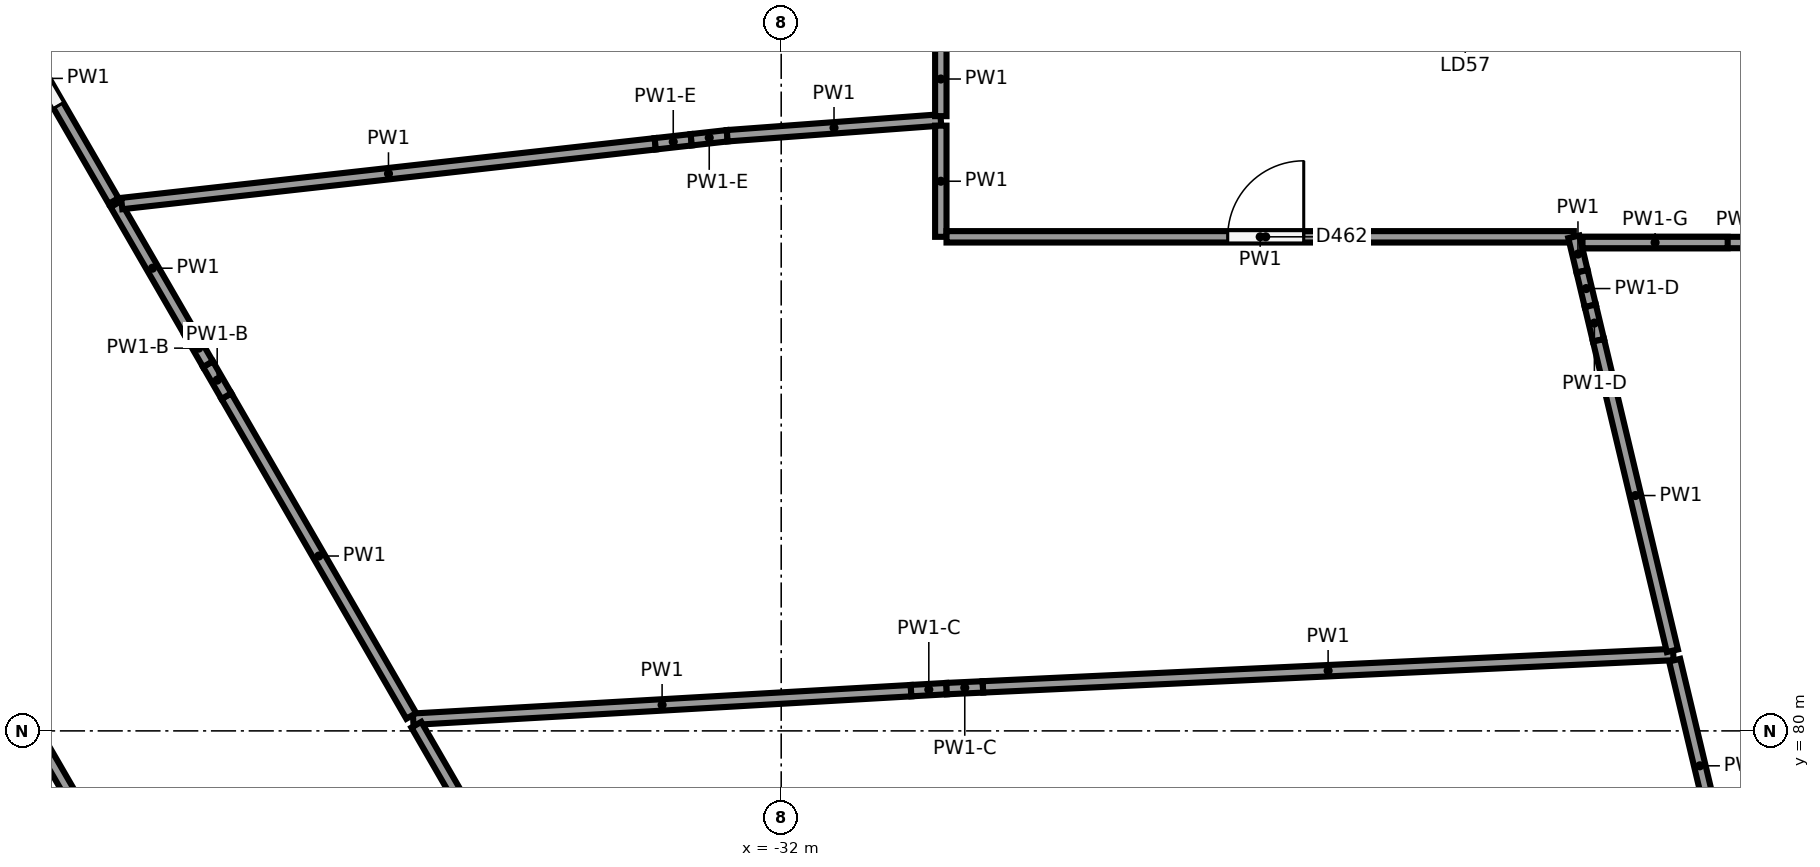
"""IFC4 building model, lengths in metres.
Left out: names, types, materials, properties, quantities, classifications, styles, units other than length and angle.
Written with IfcOpenShell. Run it as: python <this file> out.ifc"""

import sys

from ifc_helpers import new_model, si_unit, direction, frame, frame_2d, origin, origin_2d, place, context, subcontext, project, spatial, rectangle, circle, extrude, element, fill, save


model = new_model("IFC4")
c1 = context("Model", 3, precision=1e-05, world=origin(), true_north=direction((0.0, 1.0)))
c2 = subcontext(c1, "Body", "Model", "MODEL_VIEW")
j1 = project(units=[si_unit("LENGTHUNIT", "METRE"), si_unit("PLANEANGLEUNIT", "RADIAN")], contexts=[c1])
p1 = place(None, origin())
s1 = spatial("IfcSite", under=j1, at=p1, CompositionType="ELEMENT")
p2 = place(p1, origin())
s2 = spatial("IfcBuilding", under=s1, at=p2, CompositionType="ELEMENT")
p3 = place(p2, frame((0.0, 0.0, -4.0)))
s3 = spatial("IfcBuildingStorey", under=s2, at=p3, CompositionType="ELEMENT", Elevation=-4.0)
p4 = place(p3, frame((-19.119, 85.698, -1.2), z_axis=(0.0, 0.0, 1.0), x_axis=(1.0, 0.0, 0.0)))
e1 = element("IfcColumn", 1, at=p4, inside=s3, PredefinedType="COLUMN", context=c2, shape_type="SweptSolid", body=[
    extrude(circle(Radius=0.4, at=origin_2d()), origin(), (0.0, 0.0, 1.0), 5.2),
])
p5 = place(p3, frame((-31.737, 85.377, -0.4), z_axis=(0.0, 0.0, 1.0), x_axis=(1.0, 0.0, 0.0)))
e2 = element("IfcColumn", 2, at=p5, inside=s3, PredefinedType="COLUMN", context=c2, shape_type="SweptSolid", body=[
    extrude(circle(Radius=0.4, at=origin_2d()), origin(), (0.0, 0.0, 1.0), 4.4),
])
p6 = place(p3, frame((-36.842, 80.154, 0.0), z_axis=(0.0, 0.0, 1.0), x_axis=(0.998361145806, 0.057227812689, 0.0)))
e3 = element("IfcWall", 3, at=p6, inside=s3, PredefinedType="PARTITIONING", context=c2, shape_type="SweptSolid", body=[
    extrude(rectangle(XDim=6.561, YDim=0.15, at=frame_2d((3.281, 0.0))), origin(), (0.0, 0.0, 1.0), 3.6),
])
p7 = place(p3, frame((-30.292, 80.529, 0.0), z_axis=(0.0, 0.0, 1.0), x_axis=(0.998356035671, 0.057316891401, 0.0)))
e4 = element("IfcWall", 4, at=p7, inside=s3, PredefinedType="PARTITIONING", context=c2, shape_type="SweptSolid", body=[
    extrude(rectangle(XDim=0.469, YDim=0.15, at=frame_2d((0.234, 0.0))), origin(), (0.0, 0.0, 1.0), 2.7),
])
p8 = place(p3, frame((-29.824, 80.556, 0.0), z_axis=(0.0, 0.0, 1.0), x_axis=(0.998899071447, 0.046911033473, 0.0)))
e5 = element("IfcWall", 5, at=p8, inside=s3, PredefinedType="PARTITIONING", context=c2, shape_type="SweptSolid", body=[
    extrude(rectangle(XDim=0.479, YDim=0.15, at=frame_2d((0.239, 0.0))), origin(), (0.0, 0.0, 1.0), 2.7),
])
p9 = place(p3, frame((-29.346, 80.579, 0.0), z_axis=(0.0, 0.0, 1.0), x_axis=(0.998901839674, 0.04685205113, 0.0)))
e6 = element("IfcWall", 6, at=p9, inside=s3, PredefinedType="PARTITIONING", context=c2, shape_type="SweptSolid", body=[
    extrude(rectangle(XDim=9.093, YDim=0.15, at=frame_2d((4.546, 0.0))), origin(), (0.0, 0.0, 1.0), 3.6),
])
p10 = place(p3, frame((-20.245, 80.93, 0.0), z_axis=(0.0, 0.0, 1.0), x_axis=(0.231605127585, -0.972809881157, 0.0)))
e7 = element("IfcWall", 7, at=p10, inside=s3, PredefinedType="PARTITIONING", context=c2, shape_type="SweptSolid", body=[
    extrude(rectangle(XDim=2.858, YDim=0.15, at=frame_2d((1.429, 0.0))), origin(), (0.0, 0.0, 1.0), 3.6),
])
p11 = place(p3, frame((-35.411, 77.677, 0.0), z_axis=(0.0, 0.0, 1.0), x_axis=(-0.500422625408, 0.865781263357, 0.0)))
e8 = element("IfcWall", 8, at=p11, inside=s3, PredefinedType="PARTITIONING", context=c2, shape_type="SweptSolid", body=[
    extrude(rectangle(XDim=2.776, YDim=0.15, at=frame_2d((1.388, 0.0))), origin(), (0.0, 0.0, 1.0), 3.6),
])
p12 = place(p3, frame((-36.867, 80.197, 0.0), z_axis=(0.0, 0.0, 1.0), x_axis=(-0.50047176729, 0.865752857429, 0.0)))
e9 = element("IfcWall", 9, at=p12, inside=s3, PredefinedType="PARTITIONING", context=c2, shape_type="SweptSolid", body=[
    extrude(rectangle(XDim=4.86, YDim=0.15, at=frame_2d((2.43, 0.0))), origin(), (0.0, 0.0, 1.0), 3.6),
])
for number, where, z_axis, x_axis in (
    (10, (-39.299, 84.404, 0.0), (0.0, 0.0, 1.0), (-0.5, 0.866, 0.0)),
    (11, (-39.542, 84.825, 0.0), (0.0, 0.0, 1.0), (-0.5, 0.866, 0.0)),
):
    element("IfcWall", number, at=place(p3, frame(where, z_axis=z_axis, x_axis=x_axis)), inside=s3, PredefinedType="PARTITIONING", context=c2, shape_type="SweptSolid", body=[
        extrude(rectangle(XDim=0.486, YDim=0.15, at=frame_2d((0.243, 0.0))), origin(), (0.0, 0.0, 1.0), 2.5),
    ])
p13 = place(p3, frame((-39.786, 85.246, 0.0), z_axis=(0.0, 0.0, 1.0), x_axis=(-0.500352922439, 0.865821548015, 0.0)))
e12 = element("IfcWall", 12, at=p13, inside=s3, PredefinedType="PARTITIONING", context=c2, shape_type="SweptSolid", body=[
    extrude(rectangle(XDim=1.944, YDim=0.15, at=frame_2d((0.972, 0.0))), origin(), (0.0, 0.0, 1.0), 3.6),
])
p14 = place(p3, frame((-40.677, 86.938, 0.0), z_axis=(0.0, 0.0, 1.0), x_axis=(0.993791931288, 0.11125465072, 0.0)))
e13 = element("IfcWall", 13, at=p14, inside=s3, PredefinedType="PARTITIONING", context=c2, shape_type="SweptSolid", body=[
    extrude(rectangle(XDim=7.064, YDim=0.15, at=frame_2d((3.532, 0.0))), origin(), (0.0, 0.0, 1.0), 3.6),
])
for number, where, z_axis, x_axis in (
    (14, (-33.657, 87.724, 0.0), (0.0, 0.0, 1.0), (0.994, 0.111, 0.0)),
    (15, (-33.184, 87.777, 0.0), (0.0, 0.0, 1.0), (0.994, 0.111, 0.0)),
):
    element("IfcWall", number, at=place(p3, frame(where, z_axis=z_axis, x_axis=x_axis)), inside=s3, PredefinedType="PARTITIONING", context=c2, shape_type="SweptSolid", body=[
        extrude(rectangle(XDim=0.476, YDim=0.15, at=frame_2d((0.238, 0.0))), origin(), (0.0, 0.0, 1.0), 2.85),
    ])
p15 = place(p3, frame((-32.71, 87.83, 0.0), z_axis=(0.0, 0.0, 1.0), x_axis=(0.997265626559, 0.07390040652, 0.0)))
e16 = element("IfcWall", 16, at=p15, inside=s3, PredefinedType="PARTITIONING", context=c2, shape_type="SweptSolid", body=[
    extrude(rectangle(XDim=2.818, YDim=0.15, at=frame_2d((1.409, 0.0))), origin(), (0.0, 0.0, 1.0), 3.6),
])
p16 = place(p3, frame((-29.9, 87.963, 0.0), z_axis=(0.0, 0.0, 1.0), x_axis=(0.0, -1.0, 0.0)))
e17 = element("IfcWall", 17, at=p16, inside=s3, PredefinedType="PARTITIONING", context=c2, shape_type="SweptSolid", body=[
    extrude(rectangle(XDim=1.463, YDim=0.15, at=frame_2d((0.731, 0.0))), origin(), (0.0, 0.0, 1.0), 3.6),
])
p17 = place(p3, frame((-29.825, 86.5, 0.0), z_axis=(0.0, 0.0, 1.0), x_axis=(1.0, 0.0, 0.0)))
e18 = element("IfcWall", 18, at=p17, inside=s3, PredefinedType="PARTITIONING", context=c2, shape_type="SweptSolid", body=[
    extrude(rectangle(XDim=8.254, YDim=0.15, at=frame_2d((4.127, 0.0))), origin(), (0.0, 0.0, 1.0), 3.6),
])
p18 = place(p17, frame((3.7, 0.0, 0.0)))
e19 = element("IfcOpeningElement", 19, at=p18, cuts=e18, PredefinedType="OPENING", context=c2, shape_type="SweptSolid", body=[
    extrude(rectangle(XDim=1.0, YDim=2.1, at=frame_2d((0.5, 1.05))), frame((0.0, 0.085, 0.0), z_axis=(0.0, -1.0, 0.0), x_axis=(1.0, 0.0, 0.0)), (0.0, 0.0, 1.0), 0.17),
])
p19 = place(p3, frame((-21.571, 86.5, 0.0), z_axis=(0.0, 0.0, 1.0), x_axis=(0.231809170102, -0.972761280406, 0.0)))
e20 = element("IfcWall", 20, at=p19, inside=s3, PredefinedType="PARTITIONING", context=c2, shape_type="SweptSolid", body=[
    extrude(rectangle(XDim=0.467, YDim=0.15, at=frame_2d((0.233, 0.0))), origin(), (0.0, 0.0, 1.0), 3.6),
])
for number, where, z_axis, x_axis in (
    (21, (-21.463, 86.046, 0.0), (0.0, 0.0, 1.0), (0.231, -0.973, 0.0)),
    (22, (-21.355, 85.592, 0.0), (0.0, 0.0, 1.0), (0.232, -0.973, 0.0)),
):
    element("IfcWall", number, at=place(p3, frame(where, z_axis=z_axis, x_axis=x_axis)), inside=s3, PredefinedType="PARTITIONING", context=c2, shape_type="SweptSolid", body=[
        extrude(rectangle(XDim=0.467, YDim=0.15, at=frame_2d((0.233, 0.0))), origin(), (0.0, 0.0, 1.0), 2.3),
    ])
p20 = place(p3, frame((-21.247, 85.138, 0.0), z_axis=(0.0, 0.0, 1.0), x_axis=(0.231615286229, -0.972807462546, 0.0)))
e23 = element("IfcWall", 23, at=p20, inside=s3, PredefinedType="PARTITIONING", context=c2, shape_type="SweptSolid", body=[
    extrude(rectangle(XDim=4.198, YDim=0.15, at=frame_2d((2.099, 0.0))), origin(), (0.0, 0.0, 1.0), 3.6),
])
p21 = place(p3, frame((-40.783, 86.972, 0.0), z_axis=(0.0, 0.0, 1.0), x_axis=(-0.50040316576, 0.865792510765, 0.0)))
e24 = element("IfcWall", 24, at=p21, inside=s3, PredefinedType="PARTITIONING", context=c2, shape_type="SweptSolid", body=[
    extrude(rectangle(XDim=3.725, YDim=0.15, at=frame_2d((1.863, 0.0))), origin(), (0.0, 0.0, 1.0), 3.6),
])
p22 = place(p21, frame((1.45, 0.0, 0.0)))
e25 = element("IfcOpeningElement", 25, at=p22, cuts=e24, PredefinedType="OPENING", context=c2, shape_type="SweptSolid", body=[
    extrude(rectangle(XDim=1.0, YDim=2.1, at=frame_2d((0.5, 1.05))), frame((0.0, 0.085, 0.0), z_axis=(0.0, -1.0, 0.0), x_axis=(1.0, 0.0, 0.0)), (0.0, 0.0, 1.0), 0.17),
])
p23 = place(p3, frame((-29.9, 89.064, 0.0), z_axis=(0.0, 0.0, 1.0), x_axis=(0.0, -1.0, 0.0)))
e26 = element("IfcWall", 26, at=p23, inside=s3, PredefinedType="PARTITIONING", context=c2, shape_type="SweptSolid", body=[
    extrude(rectangle(XDim=0.977, YDim=0.15, at=frame_2d((0.488, 0.0))), origin(), (0.0, 0.0, 1.0), 3.6),
])
p24 = place(p3, frame((-42.022, 80.323, 0.0), z_axis=(0.0, 0.0, 1.0), x_axis=(0.500458314394, -0.865760634098, 0.0)))
e27 = element("IfcWall", 27, at=p24, inside=s3, PredefinedType="PARTITIONING", context=c2, shape_type="SweptSolid", body=[
    extrude(rectangle(XDim=3.331, YDim=0.15, at=frame_2d((1.666, 0.0))), origin(), (0.0, 0.0, 1.0), 3.6),
])
p25 = place(p3, frame((-21.457, 86.425, 0.0), z_axis=(0.0, 0.0, 1.0), x_axis=(1.0, 0.0, 0.0)))
e28 = element("IfcWall", 28, at=p25, inside=s3, PredefinedType="PARTITIONING", context=c2, shape_type="SweptSolid", body=[
    extrude(rectangle(XDim=4.33, YDim=0.15, at=frame_2d((2.165, 0.0))), origin(), (0.0, 0.0, 1.0), 2.85),
])
p26 = place(p3, frame((-21.457, 86.425, 2.85), z_axis=(0.0, 0.0, 1.0), x_axis=(1.0, 0.0, 0.0)))
e29 = element("IfcWall", 29, at=p26, inside=s3, PredefinedType="PARTITIONING", context=c2, shape_type="SweptSolid", body=[
    extrude(rectangle(XDim=1.91, YDim=0.15, at=frame_2d((0.955, 0.0))), origin(), (0.0, 0.0, 1.0), 0.75),
])
p27 = place(p18, origin())
e30 = element("IfcDoor", 30, at=p27, inside=s3, OperationType="SINGLE_SWING_RIGHT", PredefinedType="DOOR", context=c2, shape_type="SweptSolid", body=[
    extrude(rectangle(XDim=1.0, YDim=2.1, at=frame_2d((0.5, 1.05))), frame((0.0, 0.025, 0.0), z_axis=(0.0, -1.0, 0.0), x_axis=(1.0, 0.0, 0.0)), (0.0, 0.0, 1.0), 0.05),
])
fill(e19, e30)
p28 = place(p22, origin())
e31 = element("IfcDoor", 31, at=p28, inside=s3, OperationType="SINGLE_SWING_RIGHT", PredefinedType="DOOR", context=c2, shape_type="SweptSolid", body=[
    extrude(rectangle(XDim=1.0, YDim=2.1, at=frame_2d((0.5, 1.05))), frame((0.0, 0.025, 0.0), z_axis=(0.0, -1.0, 0.0), x_axis=(1.0, 0.0, 0.0)), (0.0, 0.0, 1.0), 0.05),
])
fill(e25, e31)
save(model, sys.argv[1])
